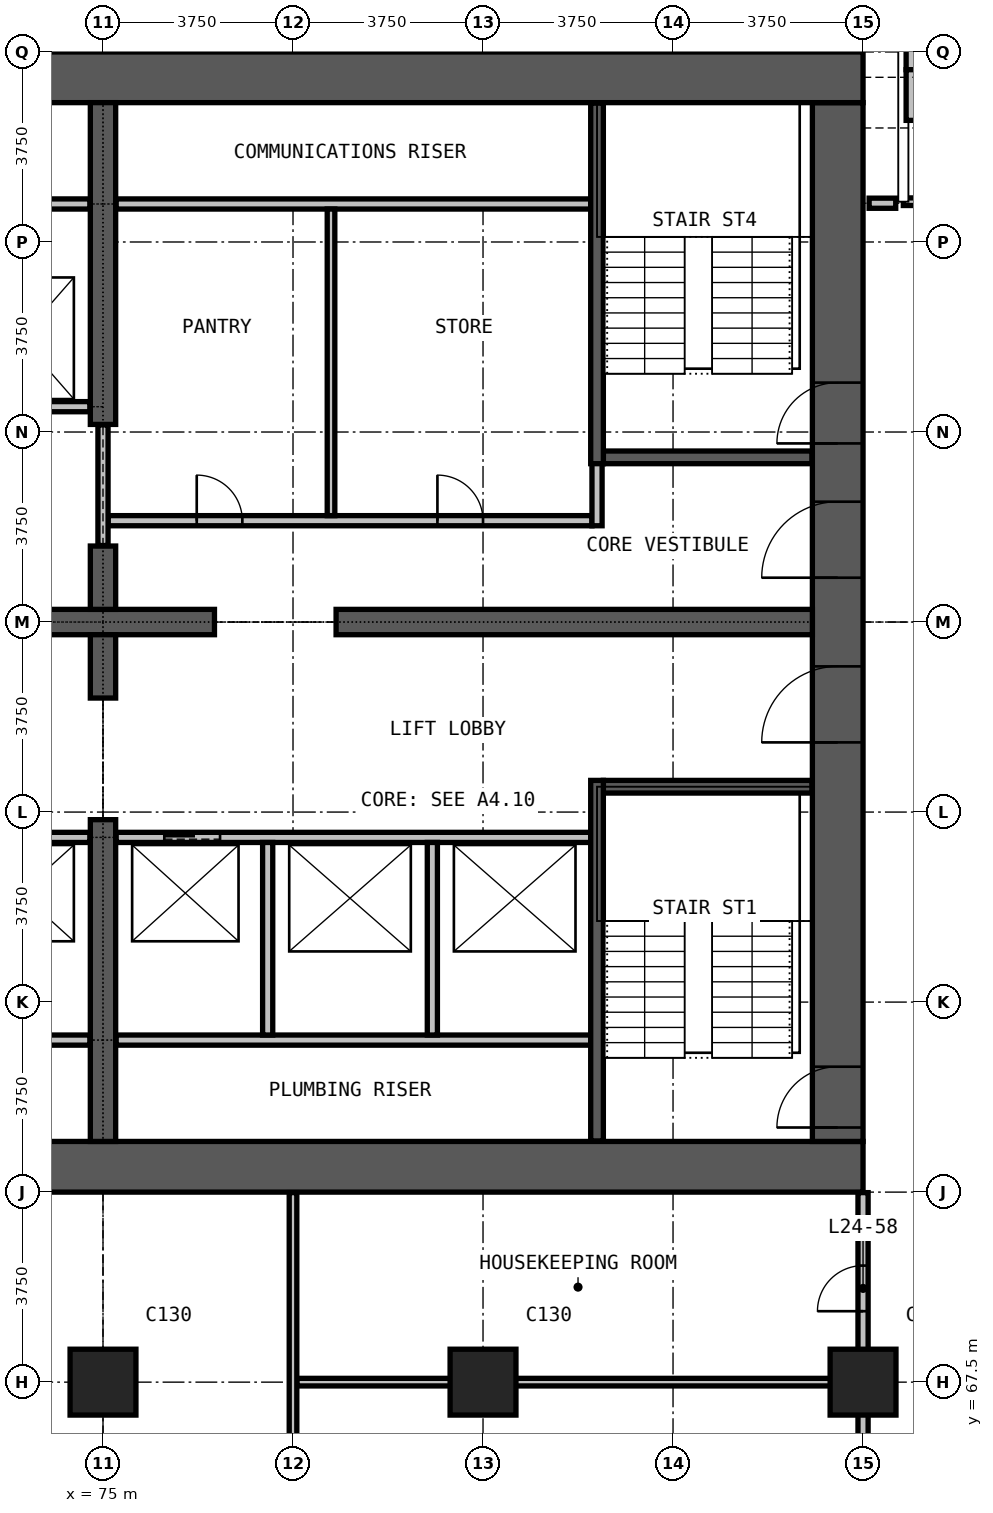
"""IFC4 building model, lengths in metres.
Left out: names, types, materials, properties, quantities, classifications, styles, units other than length and angle.
Written with IfcOpenShell. Run it as: python <this file> out.ifc"""

import sys

from ifc_helpers import new_model, si_unit, direction, frame, frame_2d, origin, origin_2d, place, context, subcontext, project, spatial, rectangle, extrude, element, fill, save


model = new_model("IFC4")
c1 = context("Model", 3, precision=1e-05, world=origin(), true_north=direction((0.0, 1.0)))
c2 = subcontext(c1, "Body", "Model", "MODEL_VIEW")
j1 = project(units=[si_unit("LENGTHUNIT", "METRE"), si_unit("PLANEANGLEUNIT", "RADIAN")], contexts=[c1])
p1 = place(None, origin())
s1 = spatial("IfcSite", under=j1, at=p1, CompositionType="ELEMENT")
p2 = place(p1, origin())
s2 = spatial("IfcBuilding", under=s1, at=p2, CompositionType="ELEMENT")
p3 = place(p2, frame((0.0, 0.0, 98.9)))
s3 = spatial("IfcBuildingStorey", under=s2, at=p3, CompositionType="ELEMENT", Elevation=98.9)
for number, where, z_axis, x_axis in (
    (1, (75.0, 67.5, 0.0), (0.0, 0.0, 1.0), (1.0, 0.0, 0.0)),
    (2, (82.5, 67.5, 0.0), (0.0, 0.0, 1.0), (1.0, 0.0, 0.0)),
    (3, (90.0, 67.5, 0.0), (0.0, 0.0, 1.0), (1.0, 0.0, 0.0)),
):
    element("IfcColumn", number, at=place(p3, frame(where, z_axis=z_axis, x_axis=x_axis)), inside=s3, PredefinedType="COLUMN", context=c2, shape_type="SweptSolid", body=[
        extrude(rectangle(XDim=1.3, YDim=1.3, at=origin_2d()), origin(), (0.0, 0.0, 1.0), 3.3),
    ])
p4 = place(p3, frame((60.0, 71.75, 0.0), z_axis=(0.0, 0.0, 1.0), x_axis=(1.0, 0.0, 0.0)))
e4 = element("IfcWall", 4, at=p4, inside=s3, PredefinedType="SHEAR", context=c2, shape_type="SweptSolid", body=[
    extrude(rectangle(XDim=30.0, YDim=1.0, at=frame_2d((15.0, 0.0))), origin(), (0.0, 0.0, 1.0), 3.3),
])
p5 = place(p3, frame((89.5, 72.25, 0.0), z_axis=(0.0, 0.0, 1.0), x_axis=(0.0, 1.0, 0.0)))
e5 = element("IfcWall", 5, at=p5, inside=s3, PredefinedType="SHEAR", context=c2, shape_type="SweptSolid", body=[
    extrude(rectangle(XDim=20.5, YDim=1.0, at=frame_2d((10.25, 0.0))), origin(), (0.0, 0.0, 1.0), 3.3),
])
p6 = place(p5, frame((0.275, 0.0, 0.0)))
e6 = element("IfcOpeningElement", 6, at=p6, cuts=e5, PredefinedType="OPENING", context=c2, shape_type="SweptSolid", body=[
    extrude(rectangle(XDim=1.2, YDim=2.2, at=frame_2d((0.6, 1.1))), frame((0.0, 0.51, 0.0), z_axis=(0.0, -1.0, 0.0), x_axis=(1.0, 0.0, 0.0)), (0.0, 0.0, 1.0), 1.02),
])
p7 = place(p5, frame((13.775, 0.0, 0.0)))
e7 = element("IfcOpeningElement", 7, at=p7, cuts=e5, PredefinedType="OPENING", context=c2, shape_type="SweptSolid", body=[
    extrude(rectangle(XDim=1.2, YDim=2.2, at=frame_2d((0.6, 1.1))), frame((0.0, 0.51, 0.0), z_axis=(0.0, -1.0, 0.0), x_axis=(1.0, 0.0, 0.0)), (0.0, 0.0, 1.0), 1.02),
])
p8 = place(p5, frame((7.875, 0.0, 0.0)))
e8 = element("IfcOpeningElement", 8, at=p8, cuts=e5, PredefinedType="OPENING", context=c2, shape_type="SweptSolid", body=[
    extrude(rectangle(XDim=1.5, YDim=2.2, at=frame_2d((0.75, 1.1))), frame((0.0, 0.51, 0.0), z_axis=(0.0, -1.0, 0.0), x_axis=(1.0, 0.0, 0.0)), (0.0, 0.0, 1.0), 1.02),
])
p9 = place(p5, frame((11.125, 0.0, 0.0)))
e9 = element("IfcOpeningElement", 9, at=p9, cuts=e5, PredefinedType="OPENING", context=c2, shape_type="SweptSolid", body=[
    extrude(rectangle(XDim=1.5, YDim=2.2, at=frame_2d((0.75, 1.1))), frame((0.0, 0.51, 0.0), z_axis=(0.0, -1.0, 0.0), x_axis=(1.0, 0.0, 0.0)), (0.0, 0.0, 1.0), 1.02),
])
p10 = place(p3, frame((90.0, 93.25, 0.0), z_axis=(0.0, 0.0, 1.0), x_axis=(-1.0, 0.0, 0.0)))
e10 = element("IfcWall", 10, at=p10, inside=s3, PredefinedType="SHEAR", context=c2, shape_type="SweptSolid", body=[
    extrude(rectangle(XDim=30.0, YDim=1.0, at=frame_2d((15.0, 0.0))), origin(), (0.0, 0.0, 1.0), 3.3),
])
p11 = place(p3, frame((72.8, 82.5, 0.0), z_axis=(0.0, 0.0, 1.0), x_axis=(1.0, 0.0, 0.0)))
e11 = element("IfcWall", 11, at=p11, inside=s3, PredefinedType="SHEAR", context=c2, shape_type="SweptSolid", body=[
    extrude(rectangle(XDim=4.4, YDim=0.5, at=frame_2d((2.2, 0.0))), origin(), (0.0, 0.0, 1.0), 3.3),
])
p12 = place(p3, frame((79.6, 82.5, 0.0), z_axis=(0.0, 0.0, 1.0), x_axis=(1.0, 0.0, 0.0)))
e12 = element("IfcWall", 12, at=p12, inside=s3, PredefinedType="SHEAR", context=c2, shape_type="SweptSolid", body=[
    extrude(rectangle(XDim=9.4, YDim=0.5, at=frame_2d((4.7, 0.0))), origin(), (0.0, 0.0, 1.0), 3.3),
])
p13 = place(p3, frame((75.0, 72.25, 0.0), z_axis=(0.0, 0.0, 1.0), x_axis=(0.0, 1.0, 0.0)))
e13 = element("IfcWall", 13, at=p13, inside=s3, PredefinedType="SHEAR", context=c2, shape_type="SweptSolid", body=[
    extrude(rectangle(XDim=6.35, YDim=0.5, at=frame_2d((3.175, 0.0))), origin(), (0.0, 0.0, 1.0), 3.3),
])
for number, where, z_axis, x_axis in (
    (14, (75.0, 81.0, 0.0), (0.0, 0.0, 1.0), (0.0, 1.0, 0.0)),
    (15, (75.0, 82.75, 0.0), (0.0, 0.0, 1.0), (0.0, 1.0, 0.0)),
):
    element("IfcWall", number, at=place(p3, frame(where, z_axis=z_axis, x_axis=x_axis)), inside=s3, PredefinedType="SHEAR", context=c2, shape_type="SweptSolid", body=[
        extrude(rectangle(XDim=1.25, YDim=0.5, at=frame_2d((0.625, 0.0))), origin(), (0.0, 0.0, 1.0), 3.3),
    ])
p14 = place(p3, frame((75.0, 86.4, 0.0), z_axis=(0.0, 0.0, 1.0), x_axis=(0.0, 1.0, 0.0)))
e16 = element("IfcWall", 16, at=p14, inside=s3, PredefinedType="SHEAR", context=c2, shape_type="SweptSolid", body=[
    extrude(rectangle(XDim=6.35, YDim=0.5, at=frame_2d((3.175, 0.0))), origin(), (0.0, 0.0, 1.0), 3.3),
])
p15 = place(p3, frame((90.795, 90.795, 0.0), z_axis=(0.0, 0.0, 1.0), x_axis=(1.0, 0.0, 0.0)))
e17 = element("IfcWall", 17, at=p15, inside=s3, PredefinedType="SOLIDWALL", context=c2, shape_type="SweptSolid", body=[
    extrude(rectangle(XDim=2.955, YDim=0.15, at=frame_2d((1.478, 0.0))), origin(), (0.0, 0.0, 1.0), 2.95),
])
p16 = place(p15, frame((0.877, 0.0, 0.0)))
e18 = element("IfcOpeningElement", 18, at=p16, cuts=e17, PredefinedType="OPENING", context=c2, shape_type="SweptSolid", body=[
    extrude(rectangle(XDim=1.2, YDim=2.4, at=frame_2d((0.6, 1.2))), frame((0.0, 0.085, 0.0), z_axis=(0.0, -1.0, 0.0), x_axis=(1.0, 0.0, 0.0)), (0.0, 0.0, 1.0), 0.17),
])
p17 = place(p3, frame((90.85, 93.625, 0.0), z_axis=(0.0, 0.0, 1.0), x_axis=(1.0, 0.0, 0.0)))
e19 = element("IfcWall", 19, at=p17, inside=s3, PredefinedType="USERDEFINED", context=c2, shape_type="SweptSolid", body=[
    extrude(rectangle(XDim=3.2, YDim=0.45, at=frame_2d((1.6, 0.0))), origin(), (0.0, 0.0, 1.0), 1.1),
])
p18 = place(p3, frame((91.075, 92.4, 0.0), z_axis=(0.0, 0.0, 1.0), x_axis=(0.0, 1.0, 0.0)))
e20 = element("IfcWall", 20, at=p18, inside=s3, PredefinedType="USERDEFINED", context=c2, shape_type="SweptSolid", body=[
    extrude(rectangle(XDim=1.0, YDim=0.45, at=frame_2d((0.5, 0.0))), origin(), (0.0, 0.0, 1.0), 1.1),
])
p19 = place(p3, frame((75.1, 84.5, 0.0), z_axis=(0.0, 0.0, 1.0), x_axis=(1.0, 0.0, 0.0)))
e21 = element("IfcWall", 21, at=p19, inside=s3, PredefinedType="PARTITIONING", context=c2, shape_type="SweptSolid", body=[
    extrude(rectangle(XDim=9.55, YDim=0.2, at=frame_2d((4.775, 0.0))), origin(), (0.0, 0.0, 1.0), 2.95),
])
p20 = place(p19, frame((1.75, 0.0, 0.0)))
e22 = element("IfcOpeningElement", 22, at=p20, cuts=e21, PredefinedType="OPENING", context=c2, shape_type="SweptSolid", body=[
    extrude(rectangle(XDim=0.9, YDim=2.2, at=frame_2d((0.45, 1.1))), frame((0.0, 0.11, 0.0), z_axis=(0.0, -1.0, 0.0), x_axis=(1.0, 0.0, 0.0)), (0.0, 0.0, 1.0), 0.22),
])
p21 = place(p19, frame((6.5, 0.0, 0.0)))
e23 = element("IfcOpeningElement", 23, at=p21, cuts=e21, PredefinedType="OPENING", context=c2, shape_type="SweptSolid", body=[
    extrude(rectangle(XDim=0.9, YDim=2.2, at=frame_2d((0.45, 1.1))), frame((0.0, 0.11, 0.0), z_axis=(0.0, -1.0, 0.0), x_axis=(1.0, 0.0, 0.0)), (0.0, 0.0, 1.0), 0.22),
])
p22 = place(p3, frame((75.26, 90.75, 0.0), z_axis=(0.0, 0.0, 1.0), x_axis=(1.0, 0.0, 0.0)))
e24 = element("IfcWall", 24, at=p22, inside=s3, PredefinedType="PARTITIONING", context=c2, shape_type="SweptSolid", body=[
    extrude(rectangle(XDim=9.365, YDim=0.2, at=frame_2d((4.683, 0.0))), origin(), (0.0, 0.0, 1.0), 2.95),
])
p23 = place(p3, frame((75.0, 84.01, 0.0), z_axis=(0.0, 0.0, 1.0), x_axis=(0.0, 1.0, 0.0)))
e25 = element("IfcWall", 25, at=p23, inside=s3, PredefinedType="PARTITIONING", context=c2, shape_type="SweptSolid", body=[
    extrude(rectangle(XDim=2.38, YDim=0.2, at=frame_2d((1.19, 0.0))), origin(), (0.0, 0.0, 1.0), 2.4),
])
p24 = place(p3, frame((84.75, 84.4, 0.0), z_axis=(0.0, 0.0, 1.0), x_axis=(0.0, 1.0, 0.0)))
e26 = element("IfcWall", 26, at=p24, inside=s3, PredefinedType="PARTITIONING", context=c2, shape_type="SweptSolid", body=[
    extrude(rectangle(XDim=1.475, YDim=0.2, at=frame_2d((0.738, 0.0))), origin(), (0.0, 0.0, 1.0), 2.95),
])
p25 = place(p3, frame((90.12, 90.765, 0.0), z_axis=(0.0, 0.0, 1.0), x_axis=(1.0, 0.0, 0.0)))
e27 = element("IfcWall", 27, at=p25, inside=s3, PredefinedType="PARTITIONING", context=c2, shape_type="SweptSolid", body=[
    extrude(rectangle(XDim=0.525, YDim=0.2, at=frame_2d((0.262, 0.0))), origin(), (0.0, 0.0, 1.0), 2.95),
])
p26 = place(p3, frame((90.0, 52.4, 0.0), z_axis=(0.0, 0.0, 1.0), x_axis=(0.0, 1.0, 0.0)))
e28 = element("IfcWall", 28, at=p26, inside=s3, PredefinedType="PARTITIONING", context=c2, shape_type="SweptSolid", body=[
    extrude(rectangle(XDim=18.84, YDim=0.2, at=frame_2d((9.42, 0.0))), origin(), (0.0, 0.0, 1.0), 2.95),
])
p27 = place(p26, frame((10.85, 0.0, 0.0)))
e29 = element("IfcOpeningElement", 29, at=p27, cuts=e28, PredefinedType="OPENING", context=c2, shape_type="SweptSolid", body=[
    extrude(rectangle(XDim=1.0, YDim=2.2, at=frame_2d((0.5, 1.1))), frame((0.0, 0.11, 0.0), z_axis=(0.0, -1.0, 0.0), x_axis=(1.0, 0.0, 0.0)), (0.0, 0.0, 1.0), 0.22),
])
p28 = place(p26, frame((16.5, 0.0, 0.0)))
e30 = element("IfcOpeningElement", 30, at=p28, cuts=e28, PredefinedType="OPENING", context=c2, shape_type="SweptSolid", body=[
    extrude(rectangle(XDim=0.9, YDim=2.2, at=frame_2d((0.45, 1.1))), frame((0.0, 0.11, 0.0), z_axis=(0.0, -1.0, 0.0), x_axis=(1.0, 0.0, 0.0)), (0.0, 0.0, 1.0), 0.22),
])
p29 = place(p3, frame((78.825, 67.5, 0.0), z_axis=(0.0, 0.0, 1.0), x_axis=(1.0, 0.0, 0.0)))
e31 = element("IfcWall", 31, at=p29, inside=s3, PredefinedType="PARTITIONING", context=c2, shape_type="SweptSolid", body=[
    extrude(rectangle(XDim=11.075, YDim=0.15, at=frame_2d((5.538, 0.0))), origin(), (0.0, 0.0, 1.0), 2.95),
])
p30 = place(p3, frame((78.75, 52.6, 0.0), z_axis=(0.0, 0.0, 1.0), x_axis=(0.0, 1.0, 0.0)))
e32 = element("IfcWall", 32, at=p30, inside=s3, PredefinedType="PARTITIONING", context=c2, shape_type="SweptSolid", body=[
    extrude(rectangle(XDim=18.64, YDim=0.15, at=frame_2d((9.32, 0.0))), origin(), (0.0, 0.0, 1.0), 2.95),
])
p31 = place(p3, frame((79.5, 84.6, 0.0), z_axis=(0.0, 0.0, 1.0), x_axis=(0.0, 1.0, 0.0)))
e33 = element("IfcWall", 33, at=p31, inside=s3, PredefinedType="PARTITIONING", context=c2, shape_type="SweptSolid", body=[
    extrude(rectangle(XDim=6.05, YDim=0.15, at=frame_2d((3.025, 0.0))), origin(), (0.0, 0.0, 1.0), 2.95),
])
for number, where, z_axis, x_axis in (
    (34, (65.375, 74.25, 0.0), (0.0, 0.0, 1.0), (1.0, 0.0, 0.0)),
    (35, (75.26, 74.25, 0.0), (0.0, 0.0, 1.0), (1.0, 0.0, 0.0)),
):
    element("IfcWall", number, at=place(p3, frame(where, z_axis=z_axis, x_axis=x_axis)), inside=s3, PredefinedType="PARTITIONING", context=c2, shape_type="SweptSolid", body=[
        extrude(rectangle(XDim=9.365, YDim=0.2, at=frame_2d((4.683, 0.0))), origin(), (0.0, 0.0, 1.0), 2.95),
    ])
p32 = place(p3, frame((65.375, 78.25, 0.0), z_axis=(0.0, 0.0, 1.0), x_axis=(1.0, 0.0, 0.0)))
e36 = element("IfcWall", 36, at=p32, inside=s3, PredefinedType="PARTITIONING", context=c2, shape_type="SweptSolid", body=[
    extrude(rectangle(XDim=9.365, YDim=0.2, at=frame_2d((4.683, 0.0))), origin(), (0.0, 0.0, 1.0), 2.95),
])
p33 = place(p32, frame((1.0, 0.0, 0.0)))
e37 = element("IfcOpeningElement", 37, at=p33, cuts=e36, PredefinedType="OPENING", context=c2, shape_type="SweptSolid", body=[
    extrude(rectangle(XDim=1.1, YDim=2.2, at=frame_2d((0.55, 1.1))), frame((0.0, 0.11, 0.0), z_axis=(0.0, -1.0, 0.0), x_axis=(1.0, 0.0, 0.0)), (0.0, 0.0, 1.0), 0.22),
])
p34 = place(p32, frame((4.175, 0.0, 0.0)))
e38 = element("IfcOpeningElement", 38, at=p34, cuts=e36, PredefinedType="OPENING", context=c2, shape_type="SweptSolid", body=[
    extrude(rectangle(XDim=1.1, YDim=2.2, at=frame_2d((0.55, 1.1))), frame((0.0, 0.11, 0.0), z_axis=(0.0, -1.0, 0.0), x_axis=(1.0, 0.0, 0.0)), (0.0, 0.0, 1.0), 0.22),
])
p35 = place(p32, frame((7.325, 0.0, 0.0)))
e39 = element("IfcOpeningElement", 39, at=p35, cuts=e36, PredefinedType="OPENING", context=c2, shape_type="SweptSolid", body=[
    extrude(rectangle(XDim=1.1, YDim=2.2, at=frame_2d((0.55, 1.1))), frame((0.0, 0.11, 0.0), z_axis=(0.0, -1.0, 0.0), x_axis=(1.0, 0.0, 0.0)), (0.0, 0.0, 1.0), 0.22),
])
p36 = place(p3, frame((75.26, 78.25, 0.0), z_axis=(0.0, 0.0, 1.0), x_axis=(1.0, 0.0, 0.0)))
e40 = element("IfcWall", 40, at=p36, inside=s3, PredefinedType="PARTITIONING", context=c2, shape_type="SweptSolid", body=[
    extrude(rectangle(XDim=9.365, YDim=0.2, at=frame_2d((4.683, 0.0))), origin(), (0.0, 0.0, 1.0), 2.95),
])
p37 = place(p36, frame((0.95, 0.0, 0.0)))
e41 = element("IfcOpeningElement", 41, at=p37, cuts=e40, PredefinedType="OPENING", context=c2, shape_type="SweptSolid", body=[
    extrude(rectangle(XDim=1.1, YDim=2.2, at=frame_2d((0.55, 1.1))), frame((0.0, 0.11, 0.0), z_axis=(0.0, -1.0, 0.0), x_axis=(1.0, 0.0, 0.0)), (0.0, 0.0, 1.0), 0.22),
])
p38 = place(p3, frame((65.375, 86.75, 0.0), z_axis=(0.0, 0.0, 1.0), x_axis=(1.0, 0.0, 0.0)))
e42 = element("IfcWall", 42, at=p38, inside=s3, PredefinedType="PARTITIONING", context=c2, shape_type="SweptSolid", body=[
    extrude(rectangle(XDim=9.365, YDim=0.2, at=frame_2d((4.683, 0.0))), origin(), (0.0, 0.0, 1.0), 2.95),
])
p39 = place(p38, frame((1.0, 0.0, 0.0)))
e43 = element("IfcOpeningElement", 43, at=p39, cuts=e42, PredefinedType="OPENING", context=c2, shape_type="SweptSolid", body=[
    extrude(rectangle(XDim=1.1, YDim=2.2, at=frame_2d((0.55, 1.1))), frame((0.0, 0.11, 0.0), z_axis=(0.0, -1.0, 0.0), x_axis=(1.0, 0.0, 0.0)), (0.0, 0.0, 1.0), 0.22),
])
p40 = place(p38, frame((4.175, 0.0, 0.0)))
e44 = element("IfcOpeningElement", 44, at=p40, cuts=e42, PredefinedType="OPENING", context=c2, shape_type="SweptSolid", body=[
    extrude(rectangle(XDim=1.1, YDim=2.2, at=frame_2d((0.55, 1.1))), frame((0.0, 0.11, 0.0), z_axis=(0.0, -1.0, 0.0), x_axis=(1.0, 0.0, 0.0)), (0.0, 0.0, 1.0), 0.22),
])
p41 = place(p38, frame((7.325, 0.0, 0.0)))
e45 = element("IfcOpeningElement", 45, at=p41, cuts=e42, PredefinedType="OPENING", context=c2, shape_type="SweptSolid", body=[
    extrude(rectangle(XDim=1.1, YDim=2.2, at=frame_2d((0.55, 1.1))), frame((0.0, 0.11, 0.0), z_axis=(0.0, -1.0, 0.0), x_axis=(1.0, 0.0, 0.0)), (0.0, 0.0, 1.0), 0.22),
])
p42 = place(p3, frame((65.375, 90.75, 0.0), z_axis=(0.0, 0.0, 1.0), x_axis=(1.0, 0.0, 0.0)))
e46 = element("IfcWall", 46, at=p42, inside=s3, PredefinedType="PARTITIONING", context=c2, shape_type="SweptSolid", body=[
    extrude(rectangle(XDim=9.365, YDim=0.2, at=frame_2d((4.683, 0.0))), origin(), (0.0, 0.0, 1.0), 2.95),
])
for number, where, z_axis, x_axis in (
    (47, (78.25, 74.35, 0.0), (0.0, 0.0, 1.0), (0.0, 1.0, 0.0)),
    (48, (81.5, 74.35, 0.0), (0.0, 0.0, 1.0), (0.0, 1.0, 0.0)),
):
    element("IfcWall", number, at=place(p3, frame(where, z_axis=z_axis, x_axis=x_axis)), inside=s3, PredefinedType="PARTITIONING", context=c2, shape_type="SweptSolid", body=[
        extrude(rectangle(XDim=3.8, YDim=0.2, at=frame_2d((1.9, 0.0))), origin(), (0.0, 0.0, 1.0), 2.95),
    ])
for number, where, z_axis, x_axis in (
    (49, (84.875, 79.25, 0.0), (0.0, 0.0, 1.0), (1.0, 0.0, 0.0)),
    (50, (84.875, 85.75, 0.0), (0.0, 0.0, 1.0), (1.0, 0.0, 0.0)),
):
    element("IfcWall", number, at=place(p3, frame(where, z_axis=z_axis, x_axis=x_axis)), inside=s3, PredefinedType="PARTITIONING", context=c2, shape_type="SweptSolid", body=[
        extrude(rectangle(XDim=4.115, YDim=0.25, at=frame_2d((2.058, 0.0))), origin(), (0.0, 0.0, 1.0), 2.95),
    ])
for number, where, z_axis, x_axis in (
    (51, (84.75, 72.26, 0.0), (0.0, 0.0, 1.0), (0.0, 1.0, 0.0)),
    (52, (84.75, 85.625, 0.0), (0.0, 0.0, 1.0), (0.0, 1.0, 0.0)),
):
    element("IfcWall", number, at=place(p3, frame(where, z_axis=z_axis, x_axis=x_axis)), inside=s3, PredefinedType="PARTITIONING", context=c2, shape_type="SweptSolid", body=[
        extrude(rectangle(XDim=7.115, YDim=0.25, at=frame_2d((3.558, 0.0))), origin(), (0.0, 0.0, 1.0), 2.95),
    ])
p43 = place(p37, origin())
e53 = element("IfcDoor", 53, at=p43, inside=s3, OperationType="DOUBLE_DOOR_SLIDING", PredefinedType="DOOR", context=c2, shape_type="SweptSolid", body=[
    extrude(rectangle(XDim=1.1, YDim=2.2, at=frame_2d((0.55, 1.1))), frame((0.0, 0.025, 0.0), z_axis=(0.0, -1.0, 0.0), x_axis=(1.0, 0.0, 0.0)), (0.0, 0.0, 1.0), 0.05),
])
fill(e41, e53)
p44 = place(p6, origin())
e54 = element("IfcDoor", 54, at=p44, inside=s3, OperationType="SINGLE_SWING_RIGHT", PredefinedType="DOOR", context=c2, shape_type="SweptSolid", body=[
    extrude(rectangle(XDim=1.2, YDim=2.2, at=frame_2d((0.6, 1.1))), frame((0.0, 0.025, 0.0), z_axis=(0.0, -1.0, 0.0), x_axis=(1.0, 0.0, 0.0)), (0.0, 0.0, 1.0), 0.05),
])
fill(e6, e54)
p45 = place(p7, origin())
e55 = element("IfcDoor", 55, at=p45, inside=s3, OperationType="SINGLE_SWING_LEFT", PredefinedType="DOOR", context=c2, shape_type="SweptSolid", body=[
    extrude(rectangle(XDim=1.2, YDim=2.2, at=frame_2d((0.6, 1.1))), frame((0.0, 0.025, 0.0), z_axis=(0.0, -1.0, 0.0), x_axis=(1.0, 0.0, 0.0)), (0.0, 0.0, 1.0), 0.05),
])
fill(e7, e55)
p46 = place(p8, origin())
e56 = element("IfcDoor", 56, at=p46, inside=s3, OperationType="DOUBLE_DOOR_SINGLE_SWING", PredefinedType="DOOR", context=c2, shape_type="SweptSolid", body=[
    extrude(rectangle(XDim=1.5, YDim=2.2, at=frame_2d((0.75, 1.1))), frame((0.0, 0.025, 0.0), z_axis=(0.0, -1.0, 0.0), x_axis=(1.0, 0.0, 0.0)), (0.0, 0.0, 1.0), 0.05),
])
fill(e8, e56)
p47 = place(p9, origin())
e57 = element("IfcDoor", 57, at=p47, inside=s3, OperationType="DOUBLE_DOOR_SINGLE_SWING", PredefinedType="DOOR", context=c2, shape_type="SweptSolid", body=[
    extrude(rectangle(XDim=1.5, YDim=2.2, at=frame_2d((0.75, 1.1))), frame((0.0, 0.025, 0.0), z_axis=(0.0, -1.0, 0.0), x_axis=(1.0, 0.0, 0.0)), (0.0, 0.0, 1.0), 0.05),
])
fill(e9, e57)
p48 = place(p20, origin())
e58 = element("IfcDoor", 58, at=p48, inside=s3, OperationType="SINGLE_SWING_LEFT", PredefinedType="DOOR", context=c2, shape_type="SweptSolid", body=[
    extrude(rectangle(XDim=0.9, YDim=2.2, at=frame_2d((0.45, 1.1))), frame((0.0, 0.025, 0.0), z_axis=(0.0, -1.0, 0.0), x_axis=(1.0, 0.0, 0.0)), (0.0, 0.0, 1.0), 0.05),
])
fill(e22, e58)
p49 = place(p21, origin())
e59 = element("IfcDoor", 59, at=p49, inside=s3, OperationType="SINGLE_SWING_LEFT", PredefinedType="DOOR", context=c2, shape_type="SweptSolid", body=[
    extrude(rectangle(XDim=0.9, YDim=2.2, at=frame_2d((0.45, 1.1))), frame((0.0, 0.025, 0.0), z_axis=(0.0, -1.0, 0.0), x_axis=(1.0, 0.0, 0.0)), (0.0, 0.0, 1.0), 0.05),
])
fill(e23, e59)
p50 = place(p28, origin())
e60 = element("IfcDoor", 60, at=p50, inside=s3, OperationType="SINGLE_SWING_LEFT", PredefinedType="DOOR", context=c2, shape_type="SweptSolid", body=[
    extrude(rectangle(XDim=0.9, YDim=2.2, at=frame_2d((0.45, 1.1))), frame((0.0, 0.025, 0.0), z_axis=(0.0, -1.0, 0.0), x_axis=(1.0, 0.0, 0.0)), (0.0, 0.0, 1.0), 0.05),
])
fill(e30, e60)
save(model, sys.argv[1])
